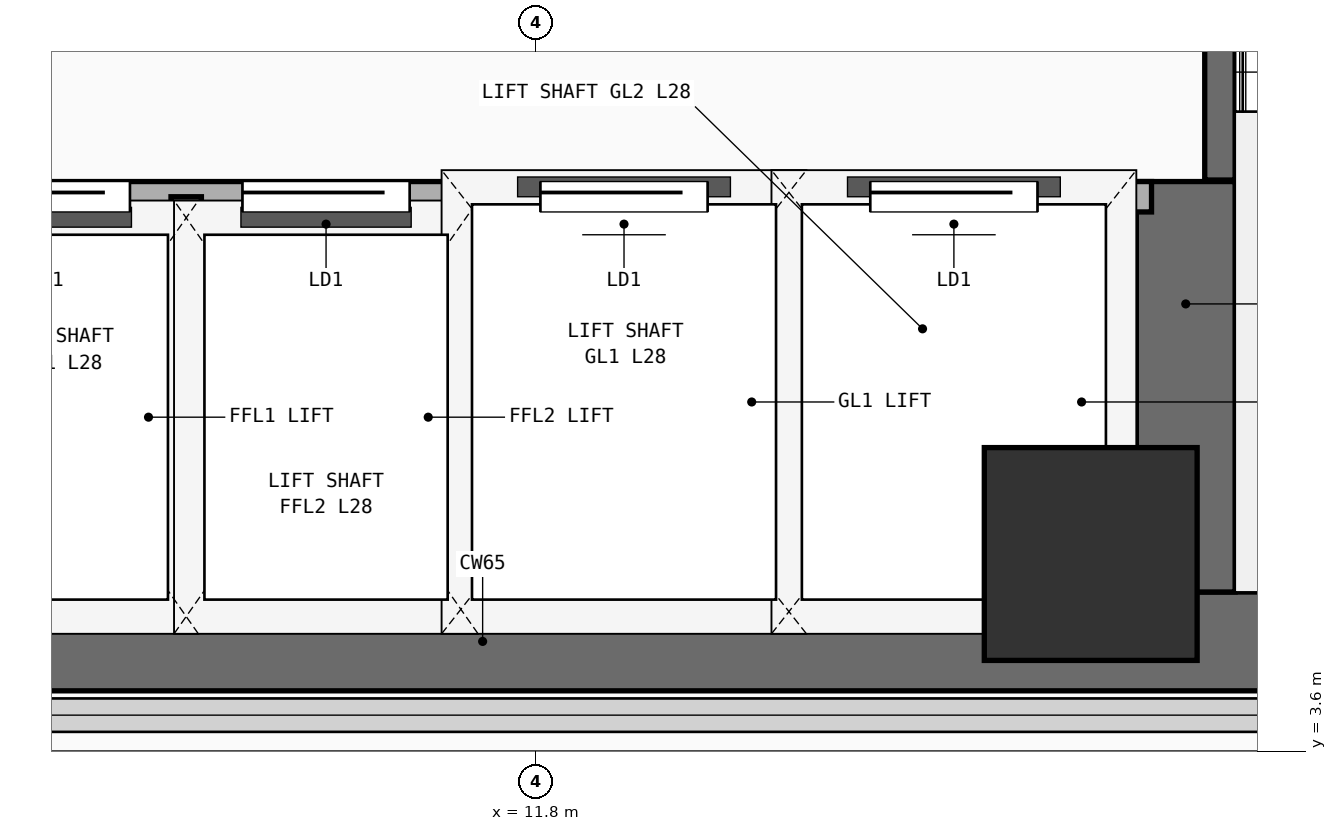
"""IFC4 building model, lengths in metres.
Left out: names, types, materials, properties, quantities, classifications, styles, units other than length and angle.
Written with IfcOpenShell. Run it as: python <this file> out.ifc"""

import sys

from ifc_helpers import new_model, si_unit, direction, frame, frame_2d, origin, origin_2d, place, context, subcontext, project, spatial, rectangle, extrude, element, fill, save


model = new_model("IFC4")
c1 = context("Model", 3, precision=1e-05, world=origin(), true_north=direction((0.0, 1.0)))
c2 = subcontext(c1, "Body", "Model", "MODEL_VIEW")
j1 = project(units=[si_unit("LENGTHUNIT", "METRE"), si_unit("PLANEANGLEUNIT", "RADIAN")], contexts=[c1])
p1 = place(None, origin())
s1 = spatial("IfcSite", under=j1, at=p1, CompositionType="ELEMENT")
p2 = place(p1, origin())
s2 = spatial("IfcBuilding", under=s1, at=p2, CompositionType="ELEMENT")
p3 = place(p2, frame((0.0, 0.0, 110.7)))
s3 = spatial("IfcBuildingStorey", under=s2, at=p3, CompositionType="ELEMENT", Elevation=110.7)
p4 = place(p3, frame((7.125, 4.325, 0.0), z_axis=(0.0, 0.0, 1.0), x_axis=(1.0, 0.0, 0.0)))
e1 = element("IfcWall", 1, at=p4, inside=s3, PredefinedType="SHEAR", context=c2, shape_type="SweptSolid", body=[
    extrude(rectangle(XDim=14.0, YDim=0.65, at=frame_2d((7.0, 0.0))), origin(), (0.0, 0.0, 1.0), 3.54),
])
p5 = place(p3, frame((16.075, 4.65, 0.0), z_axis=(0.0, 0.0, 1.0), x_axis=(0.0, 1.0, 0.0)))
e2 = element("IfcWall", 2, at=p5, inside=s3, PredefinedType="SHEAR", context=c2, shape_type="SweptSolid", body=[
    extrude(rectangle(XDim=2.7, YDim=0.65, at=frame_2d((1.35, 0.0))), origin(), (0.0, 0.0, 1.0), 3.54),
])
p6 = place(p3, frame((15.45, 4.9, 0.0), z_axis=(0.0, 0.0, 1.0), x_axis=(1.0, 0.0, 0.0)))
e3 = element("IfcColumn", 3, at=p6, inside=s3, PredefinedType="COLUMN", context=c2, shape_type="SweptSolid", body=[
    extrude(rectangle(XDim=1.4, YDim=1.4, at=origin_2d()), origin(), (0.0, 0.0, 1.0), 3.54),
])
p7 = place(p3, frame((16.3, 7.36, 0.0), z_axis=(0.0, 0.0, 1.0), x_axis=(0.0, 1.0, 0.0)))
e4 = element("IfcWall", 4, at=p7, inside=s3, PredefinedType="SHEAR", context=c2, shape_type="SweptSolid", body=[
    extrude(rectangle(XDim=2.58, YDim=0.2, at=frame_2d((1.29, 0.0))), origin(), (0.0, 0.0, 1.0), 3.54),
])
p8 = place(p3, frame((7.5, 7.25, 0.0), z_axis=(0.0, 0.0, 1.0), x_axis=(1.0, 0.0, 0.0)))
e5 = element("IfcWall", 5, at=p8, inside=s3, PredefinedType="PARTITIONING", context=c2, shape_type="SweptSolid", body=[
    extrude(rectangle(XDim=8.35, YDim=0.2, at=frame_2d((4.175, 0.0))), origin(), (0.0, 0.0, 1.0), 3.54),
])
p9 = place(p8, frame((0.53, 0.0, 0.0)))
e6 = element("IfcOpeningElement", 6, at=p9, cuts=e5, PredefinedType="OPENING", context=c2, shape_type="SweptSolid", body=[
    extrude(rectangle(XDim=1.1, YDim=2.2, at=frame_2d((0.55, 1.1))), frame((0.0, 0.11, 0.0), z_axis=(0.0, -1.0, 0.0), x_axis=(1.0, 0.0, 0.0)), (0.0, 0.0, 1.0), 0.22),
])
p10 = place(p8, frame((2.37, 0.0, 0.0)))
e7 = element("IfcOpeningElement", 7, at=p10, cuts=e5, PredefinedType="OPENING", context=c2, shape_type="SweptSolid", body=[
    extrude(rectangle(XDim=1.1, YDim=2.2, at=frame_2d((0.55, 1.1))), frame((0.0, 0.11, 0.0), z_axis=(0.0, -1.0, 0.0), x_axis=(1.0, 0.0, 0.0)), (0.0, 0.0, 1.0), 0.22),
])
p11 = place(p8, frame((4.33, 0.0, 0.0)))
e8 = element("IfcOpeningElement", 8, at=p11, cuts=e5, PredefinedType="OPENING", context=c2, shape_type="SweptSolid", body=[
    extrude(rectangle(XDim=1.1, YDim=2.2, at=frame_2d((0.55, 1.1))), frame((0.0, 0.11, 0.0), z_axis=(0.0, -1.0, 0.0), x_axis=(1.0, 0.0, 0.0)), (0.0, 0.0, 1.0), 0.22),
])
p12 = place(p8, frame((6.5, 0.0, 0.0)))
e9 = element("IfcOpeningElement", 9, at=p12, cuts=e5, PredefinedType="OPENING", context=c2, shape_type="SweptSolid", body=[
    extrude(rectangle(XDim=1.1, YDim=2.2, at=frame_2d((0.55, 1.1))), frame((0.0, 0.11, 0.0), z_axis=(0.0, -1.0, 0.0), x_axis=(1.0, 0.0, 0.0)), (0.0, 0.0, 1.0), 0.22),
])
for number, where, z_axis, x_axis in (
    (10, (9.5, 4.45, 0.0), (0.0, 0.0, 1.0), (0.0, 1.0, 0.0)),
    (11, (11.36, 4.45, 0.0), (0.0, 0.0, 1.0), (0.0, 1.0, 0.0)),
    (12, (13.46, 4.45, 0.0), (0.0, 0.0, 1.0), (0.0, 1.0, 0.0)),
):
    element("IfcWall", number, at=place(p3, frame(where, z_axis=z_axis, x_axis=x_axis)), inside=s3, PredefinedType="PARTITIONING", context=c2, shape_type="SweptSolid", body=[
        extrude(rectangle(XDim=2.8, YDim=0.2, at=frame_2d((1.4, 0.0))), origin(), (0.0, 0.0, 1.0), 3.54),
    ])
p13 = place(p9, origin())
e13 = element("IfcDoor", 13, at=p13, inside=s3, OperationType="SLIDING_TO_LEFT", PredefinedType="DOOR", context=c2, shape_type="SweptSolid", body=[
    extrude(rectangle(XDim=1.1, YDim=2.2, at=frame_2d((0.55, 1.1))), frame((0.0, 0.025, 0.0), z_axis=(0.0, -1.0, 0.0), x_axis=(1.0, 0.0, 0.0)), (0.0, 0.0, 1.0), 0.05),
])
fill(e6, e13)
p14 = place(p10, origin())
e14 = element("IfcDoor", 14, at=p14, inside=s3, OperationType="SLIDING_TO_LEFT", PredefinedType="DOOR", context=c2, shape_type="SweptSolid", body=[
    extrude(rectangle(XDim=1.1, YDim=2.2, at=frame_2d((0.55, 1.1))), frame((0.0, 0.025, 0.0), z_axis=(0.0, -1.0, 0.0), x_axis=(1.0, 0.0, 0.0)), (0.0, 0.0, 1.0), 0.05),
])
fill(e7, e14)
p15 = place(p11, origin())
e15 = element("IfcDoor", 15, at=p15, inside=s3, OperationType="SLIDING_TO_LEFT", PredefinedType="DOOR", context=c2, shape_type="SweptSolid", body=[
    extrude(rectangle(XDim=1.1, YDim=2.2, at=frame_2d((0.55, 1.1))), frame((0.0, 0.025, 0.0), z_axis=(0.0, -1.0, 0.0), x_axis=(1.0, 0.0, 0.0)), (0.0, 0.0, 1.0), 0.05),
])
fill(e8, e15)
p16 = place(p12, origin())
e16 = element("IfcDoor", 16, at=p16, inside=s3, OperationType="SLIDING_TO_LEFT", PredefinedType="DOOR", context=c2, shape_type="SweptSolid", body=[
    extrude(rectangle(XDim=1.1, YDim=2.2, at=frame_2d((0.55, 1.1))), frame((0.0, 0.025, 0.0), z_axis=(0.0, -1.0, 0.0), x_axis=(1.0, 0.0, 0.0)), (0.0, 0.0, 1.0), 0.05),
])
fill(e9, e16)
save(model, sys.argv[1])
